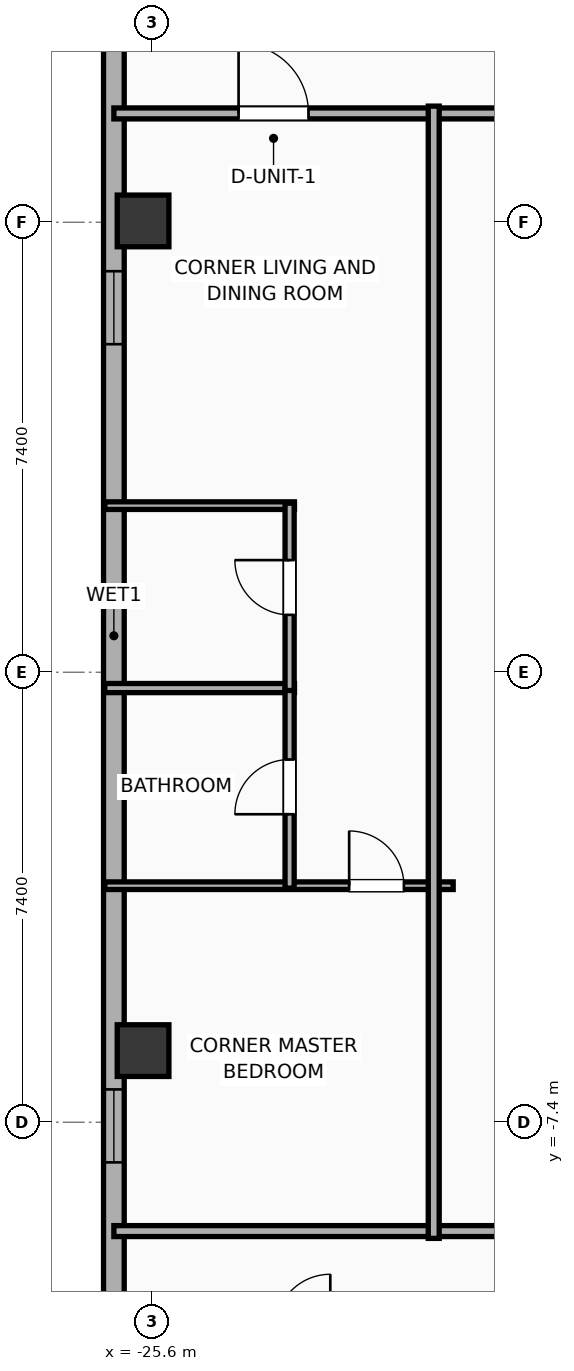
"""IFC4 building model, lengths in metres.
Left out: names, types, materials, properties, quantities, classifications, styles, units other than length and angle.
Written with IfcOpenShell. Run it as: python <this file> out.ifc"""

import sys

from ifc_helpers import new_model, si_unit, direction, frame, frame_2d, origin, origin_2d, place, context, subcontext, project, spatial, rectangle, hollow_rectangle, extrude, element, fill, save


model = new_model("IFC4")
c1 = context("Model", 3, precision=1e-05, world=origin(), true_north=direction((0.0, 1.0)))
c2 = subcontext(c1, "Body", "Model", "MODEL_VIEW")
j1 = project(units=[si_unit("LENGTHUNIT", "METRE"), si_unit("PLANEANGLEUNIT", "RADIAN")], contexts=[c1])
p1 = place(None, origin())
s1 = spatial("IfcSite", under=j1, at=p1, CompositionType="ELEMENT")
p2 = place(p1, origin())
s2 = spatial("IfcBuilding", under=s1, at=p2, CompositionType="ELEMENT")
p3 = place(p2, frame((0.0, 0.0, 223.6)))
s3 = spatial("IfcBuildingStorey", under=s2, at=p3, CompositionType="ELEMENT", Elevation=223.6)
for number, where, z_axis, x_axis in (
    (1, (-25.75, 7.422, 0.0), (0.0, 0.0, 1.0), (1.0, 0.0, 0.0)),
    (2, (-25.75, -6.222, 0.0), (0.0, 0.0, 1.0), (1.0, 0.0, 0.0)),
):
    element("IfcColumn", number, at=place(p3, frame(where, z_axis=z_axis, x_axis=x_axis)), inside=s3, PredefinedType="COLUMN", context=c2, shape_type="SweptSolid", body=[
        extrude(hollow_rectangle(XDim=0.85, YDim=0.85, WallThickness=0.028, at=origin_2d()), origin(), (0.0, 0.0, 1.0), 3.9),
    ])
p4 = place(p3, frame((-26.23, -15.383, 0.0), z_axis=(0.0, 0.0, 1.0), x_axis=(0.0, 1.0, 0.0)))
e3 = element("IfcWall", 3, at=p4, inside=s3, PredefinedType="ELEMENTEDWALL", context=c2, shape_type="SweptSolid", body=[
    extrude(rectangle(XDim=31.967, YDim=0.34, at=frame_2d((15.983, 0.0))), origin(), (0.0, 0.0, 1.0), 3.65),
])
p5 = place(p4, frame((29.55, 0.0, 0.75)))
e4 = element("IfcOpeningElement", 4, at=p5, cuts=e3, PredefinedType="OPENING", context=c2, shape_type="SweptSolid", body=[
    extrude(rectangle(XDim=1.2, YDim=2.05, at=frame_2d((0.6, 1.025))), frame((0.0, 0.18, 0.0), z_axis=(0.0, -1.0, 0.0), x_axis=(1.0, 0.0, 0.0)), (0.0, 0.0, 1.0), 0.36),
])
p6 = place(p4, frame((20.778, 0.0, 0.75)))
e5 = element("IfcOpeningElement", 5, at=p6, cuts=e3, PredefinedType="OPENING", context=c2, shape_type="SweptSolid", body=[
    extrude(rectangle(XDim=1.2, YDim=2.05, at=frame_2d((0.6, 1.025))), frame((0.0, 0.18, 0.0), z_axis=(0.0, -1.0, 0.0), x_axis=(1.0, 0.0, 0.0)), (0.0, 0.0, 1.0), 0.36),
])
p7 = place(p4, frame((7.323, 0.0, 0.75)))
e6 = element("IfcOpeningElement", 6, at=p7, cuts=e3, PredefinedType="OPENING", context=c2, shape_type="SweptSolid", body=[
    extrude(rectangle(XDim=1.2, YDim=2.05, at=frame_2d((0.6, 1.025))), frame((0.0, 0.18, 0.0), z_axis=(0.0, -1.0, 0.0), x_axis=(1.0, 0.0, 0.0)), (0.0, 0.0, 1.0), 0.36),
])
p8 = place(p3, frame((-26.23, 9.19, 0.0), z_axis=(0.0, 0.0, 1.0), x_axis=(1.0, 0.0, 0.0)))
e7 = element("IfcWall", 7, at=p8, inside=s3, PredefinedType="PARTITIONING", context=c2, shape_type="SweptSolid", body=[
    extrude(rectangle(XDim=16.35, YDim=0.18, at=frame_2d((8.175, 0.0))), origin(), (0.0, 0.0, 1.0), 3.65),
])
p9 = place(p8, frame((2.051, 0.0, 0.0)))
e8 = element("IfcOpeningElement", 8, at=p9, cuts=e7, PredefinedType="OPENING", context=c2, shape_type="SweptSolid", body=[
    extrude(rectangle(XDim=1.15, YDim=2.05, at=frame_2d((0.575, 1.025))), frame((0.0, 0.1, 0.0), z_axis=(0.0, -1.0, 0.0), x_axis=(1.0, 0.0, 0.0)), (0.0, 0.0, 1.0), 0.2),
])
p10 = place(p3, frame((-26.23, -9.19, 0.0), z_axis=(0.0, 0.0, 1.0), x_axis=(1.0, 0.0, 0.0)))
e9 = element("IfcWall", 9, at=p10, inside=s3, PredefinedType="PARTITIONING", context=c2, shape_type="SweptSolid", body=[
    extrude(rectangle(XDim=16.35, YDim=0.18, at=frame_2d((8.175, 0.0))), origin(), (0.0, 0.0, 1.0), 3.65),
])
p11 = place(p3, frame((-26.38, 2.74, 0.0), z_axis=(0.0, 0.0, 1.0), x_axis=(1.0, 0.0, 0.0)))
e10 = element("IfcWall", 10, at=p11, inside=s3, PredefinedType="PARTITIONING", context=c2, shape_type="SweptSolid", body=[
    extrude(rectangle(XDim=3.12, YDim=0.125, at=frame_2d((1.56, 0.0))), origin(), (0.0, 0.0, 1.0), 3.65),
])
p12 = place(p3, frame((-26.38, -0.26, 0.0), z_axis=(0.0, 0.0, 1.0), x_axis=(1.0, 0.0, 0.0)))
e11 = element("IfcWall", 11, at=p12, inside=s3, PredefinedType="PLUMBINGWALL", context=c2, shape_type="SweptSolid", body=[
    extrude(rectangle(XDim=3.12, YDim=0.15, at=frame_2d((1.56, 0.0))), origin(), (0.0, 0.0, 1.0), 3.65),
])
p13 = place(p3, frame((-26.38, -3.51, 0.0), z_axis=(0.0, 0.0, 1.0), x_axis=(1.0, 0.0, 0.0)))
e12 = element("IfcWall", 12, at=p13, inside=s3, PredefinedType="PARTITIONING", context=c2, shape_type="SweptSolid", body=[
    extrude(rectangle(XDim=5.73, YDim=0.125, at=frame_2d((2.865, 0.0))), origin(), (0.0, 0.0, 1.0), 3.65),
])
p14 = place(p13, frame((4.019, 0.0, 0.0)))
e13 = element("IfcOpeningElement", 13, at=p14, cuts=e12, PredefinedType="OPENING", context=c2, shape_type="SweptSolid", body=[
    extrude(rectangle(XDim=0.9, YDim=2.05, at=frame_2d((0.45, 1.025))), frame((0.0, 0.073, 0.0), z_axis=(0.0, -1.0, 0.0), x_axis=(1.0, 0.0, 0.0)), (0.0, 0.0, 1.0), 0.145),
])
p15 = place(p3, frame((-23.34, -3.55, 0.0), z_axis=(0.0, 0.0, 1.0), x_axis=(0.0, 1.0, 0.0)))
e14 = element("IfcWall", 14, at=p15, inside=s3, PredefinedType="PLUMBINGWALL", context=c2, shape_type="SweptSolid", body=[
    extrude(rectangle(XDim=3.33, YDim=0.15, at=frame_2d((1.665, 0.0))), origin(), (0.0, 0.0, 1.0), 3.65),
])
p16 = place(p15, frame((1.215, 0.0, 0.0)))
e15 = element("IfcOpeningElement", 15, at=p16, cuts=e14, PredefinedType="OPENING", context=c2, shape_type="SweptSolid", body=[
    extrude(rectangle(XDim=0.9, YDim=2.05, at=frame_2d((0.45, 1.025))), frame((0.0, 0.085, 0.0), z_axis=(0.0, -1.0, 0.0), x_axis=(1.0, 0.0, 0.0)), (0.0, 0.0, 1.0), 0.17),
])
p17 = place(p3, frame((-23.34, -0.3, 0.0), z_axis=(0.0, 0.0, 1.0), x_axis=(0.0, 1.0, 0.0)))
e16 = element("IfcWall", 16, at=p17, inside=s3, PredefinedType="PLUMBINGWALL", context=c2, shape_type="SweptSolid", body=[
    extrude(rectangle(XDim=3.08, YDim=0.15, at=frame_2d((1.54, 0.0))), origin(), (0.0, 0.0, 1.0), 3.65),
])
p18 = place(p17, frame((1.244, 0.0, 0.0)))
e17 = element("IfcOpeningElement", 17, at=p18, cuts=e16, PredefinedType="OPENING", context=c2, shape_type="SweptSolid", body=[
    extrude(rectangle(XDim=0.9, YDim=2.05, at=frame_2d((0.45, 1.025))), frame((0.0, 0.085, 0.0), z_axis=(0.0, -1.0, 0.0), x_axis=(1.0, 0.0, 0.0)), (0.0, 0.0, 1.0), 0.17),
])
p19 = place(p3, frame((-20.97, -9.31, 0.0), z_axis=(0.0, 0.0, 1.0), x_axis=(0.0, 1.0, 0.0)))
e18 = element("IfcWall", 18, at=p19, inside=s3, PredefinedType="PARTITIONING", context=c2, shape_type="SweptSolid", body=[
    extrude(rectangle(XDim=18.62, YDim=0.18, at=frame_2d((9.31, 0.0))), origin(), (0.0, 0.0, 1.0), 3.65),
])
p20 = place(p6, origin())
e19 = element("IfcWindow", 19, at=p20, inside=s3, PartitioningType="SINGLE_PANEL", PredefinedType="WINDOW", context=c2, shape_type="SweptSolid", body=[
    extrude(rectangle(XDim=1.2, YDim=2.05, at=frame_2d((0.6, 1.025))), frame((0.0, 0.03, 0.0), z_axis=(0.0, -1.0, 0.0), x_axis=(1.0, 0.0, 0.0)), (0.0, 0.0, 1.0), 0.06),
])
fill(e5, e19)
p21 = place(p7, origin())
e20 = element("IfcWindow", 20, at=p21, inside=s3, PartitioningType="SINGLE_PANEL", PredefinedType="WINDOW", context=c2, shape_type="SweptSolid", body=[
    extrude(rectangle(XDim=1.2, YDim=2.05, at=frame_2d((0.6, 1.025))), frame((0.0, 0.03, 0.0), z_axis=(0.0, -1.0, 0.0), x_axis=(1.0, 0.0, 0.0)), (0.0, 0.0, 1.0), 0.06),
])
fill(e6, e20)
p22 = place(p9, origin())
e21 = element("IfcDoor", 21, at=p22, inside=s3, OperationType="SINGLE_SWING_LEFT", PredefinedType="DOOR", context=c2, shape_type="SweptSolid", body=[
    extrude(rectangle(XDim=1.15, YDim=2.05, at=frame_2d((0.575, 1.025))), frame((0.0, 0.025, 0.0), z_axis=(0.0, -1.0, 0.0), x_axis=(1.0, 0.0, 0.0)), (0.0, 0.0, 1.0), 0.05),
])
fill(e8, e21)
p23 = place(p14, origin())
e22 = element("IfcDoor", 22, at=p23, inside=s3, OperationType="SINGLE_SWING_LEFT", PredefinedType="DOOR", context=c2, shape_type="SweptSolid", body=[
    extrude(rectangle(XDim=0.9, YDim=2.05, at=frame_2d((0.45, 1.025))), frame((0.0, 0.025, 0.0), z_axis=(0.0, -1.0, 0.0), x_axis=(1.0, 0.0, 0.0)), (0.0, 0.0, 1.0), 0.05),
])
fill(e13, e22)
p24 = place(p16, origin())
e23 = element("IfcDoor", 23, at=p24, inside=s3, OperationType="SINGLE_SWING_LEFT", PredefinedType="DOOR", context=c2, shape_type="SweptSolid", body=[
    extrude(rectangle(XDim=0.9, YDim=2.05, at=frame_2d((0.45, 1.025))), frame((0.0, 0.025, 0.0), z_axis=(0.0, -1.0, 0.0), x_axis=(1.0, 0.0, 0.0)), (0.0, 0.0, 1.0), 0.05),
])
fill(e15, e23)
p25 = place(p18, origin())
e24 = element("IfcDoor", 24, at=p25, inside=s3, OperationType="SINGLE_SWING_RIGHT", PredefinedType="DOOR", context=c2, shape_type="SweptSolid", body=[
    extrude(rectangle(XDim=0.9, YDim=2.05, at=frame_2d((0.45, 1.025))), frame((0.0, 0.025, 0.0), z_axis=(0.0, -1.0, 0.0), x_axis=(1.0, 0.0, 0.0)), (0.0, 0.0, 1.0), 0.05),
])
fill(e17, e24)
save(model, sys.argv[1])
